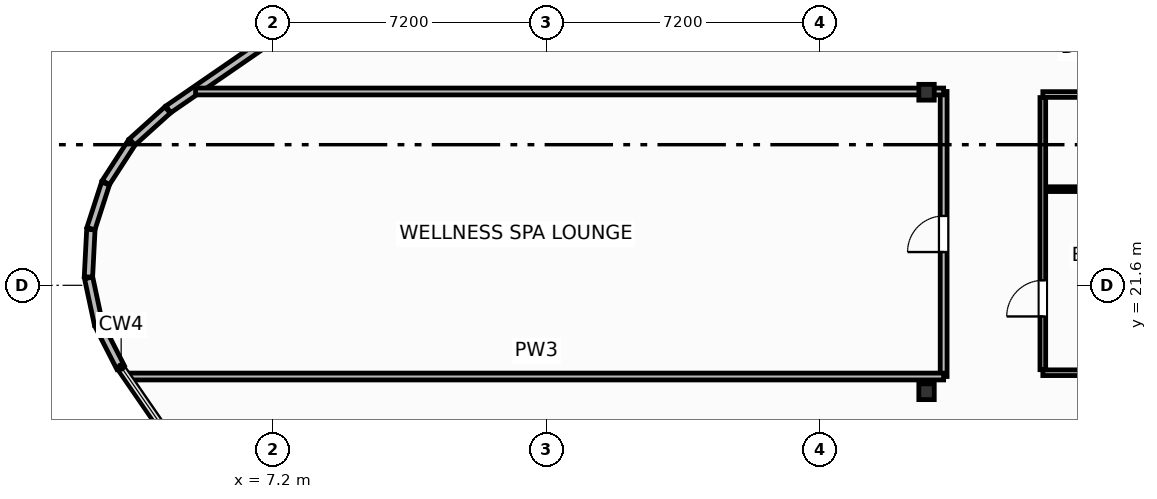
"""IFC4 building model, lengths in metres.
Left out: names, types, materials, properties, quantities, classifications, styles, units other than length and angle.
Written with IfcOpenShell. Run it as: python <this file> out.ifc"""

import sys

from ifc_helpers import new_model, si_unit, direction, frame, frame_2d, origin, origin_2d, place, context, subcontext, project, spatial, rectangle, i_section, extrude, element, fill, save


model = new_model("IFC4")
c1 = context("Model", 3, precision=1e-05, world=origin(), true_north=direction((0.0, 1.0)))
c2 = subcontext(c1, "Body", "Model", "MODEL_VIEW")
j1 = project(units=[si_unit("LENGTHUNIT", "METRE"), si_unit("PLANEANGLEUNIT", "RADIAN")], contexts=[c1])
p1 = place(None, origin())
s1 = spatial("IfcSite", under=j1, at=p1, CompositionType="ELEMENT")
p2 = place(p1, origin())
s2 = spatial("IfcBuilding", under=s1, at=p2, CompositionType="ELEMENT")
p3 = place(p2, frame((0.0, 0.0, 280.4)))
s3 = spatial("IfcBuildingStorey", under=s2, at=p3, CompositionType="ELEMENT", Elevation=280.4)
for number, where, z_axis, x_axis in (
    (1, (24.4, 18.8, 0.0), (0.0, 0.0, 1.0), (1.0, 0.0, 0.0)),
    (2, (24.4, 26.68, 0.0), (0.0, 0.0, 1.0), (1.0, 0.0, 0.0)),
):
    element("IfcColumn", number, at=place(p3, frame(where, z_axis=z_axis, x_axis=x_axis)), inside=s3, PredefinedType="COLUMN", context=c2, shape_type="SweptSolid", body=[
        extrude(i_section(OverallWidth=0.406, OverallDepth=0.416, WebThickness=0.03, FlangeThickness=0.048, FilletRadius=0.025, at=origin_2d()), origin(), (0.0, 0.0, 1.0), 3.7),
    ])
p4 = place(p3, frame((13.408, 32.402, 0.0), z_axis=(0.0, 0.0, 1.0), x_axis=(-0.823527634633, -0.567276154087, 0.0)))
e3 = element("IfcWall", 3, at=p4, inside=s3, PredefinedType="SOLIDWALL", context=c2, shape_type="SweptSolid", body=[
    extrude(rectangle(XDim=10.88, YDim=0.22, at=frame_2d((5.44, 0.0))), origin(), (0.0, 0.0, 1.0), 2.73),
])
p5 = place(p4, frame((4.39, 0.0, 0.8)))
e4 = element("IfcOpeningElement", 4, at=p5, cuts=e3, PredefinedType="OPENING", context=c2, shape_type="SweptSolid", body=[
    extrude(rectangle(XDim=2.1, YDim=1.75, at=frame_2d((1.05, 0.875))), frame((0.0, 0.12, 0.0), z_axis=(0.0, -1.0, 0.0), x_axis=(1.0, 0.0, 0.0)), (0.0, 0.0, 1.0), 0.24),
])
p6 = place(p3, frame((4.429, 26.213, 0.0), z_axis=(0.0, 0.0, 1.0), x_axis=(-0.742414330744, -0.669941013453, 0.0)))
e5 = element("IfcWall", 5, at=p6, inside=s3, PredefinedType="SOLIDWALL", context=c2, shape_type="SweptSolid", body=[
    extrude(rectangle(XDim=1.257, YDim=0.22, at=frame_2d((0.628, 0.0))), origin(), (0.0, 0.0, 1.0), 2.73),
])
for number, where, z_axis, x_axis in (
    (6, (3.482, 25.351, 0.0), (0.0, 0.0, 1.0), (-0.544, -0.839, 0.0)),
    (7, (2.796, 24.279, 0.0), (0.0, 0.0, 1.0), (-0.308, -0.951, 0.0)),
    (8, (2.41, 23.066, 0.0), (0.0, 0.0, 1.0), (-0.051, -0.999, 0.0)),
):
    element("IfcWall", number, at=place(p3, frame(where, z_axis=z_axis, x_axis=x_axis)), inside=s3, PredefinedType="SOLIDWALL", context=c2, shape_type="SweptSolid", body=[
        extrude(rectangle(XDim=1.249, YDim=0.22, at=frame_2d((0.624, 0.0))), origin(), (0.0, 0.0, 1.0), 2.73),
    ])
for number, where, z_axis, x_axis in (
    (9, (2.351, 21.795, 0.0), (0.0, 0.0, 1.0), (0.209, -0.978, 0.0)),
    (10, (2.623, 20.551, 0.0), (0.0, 0.0, 1.0), (0.455, -0.891, 0.0)),
):
    element("IfcWall", number, at=place(p3, frame(where, z_axis=z_axis, x_axis=x_axis)), inside=s3, PredefinedType="SOLIDWALL", context=c2, shape_type="SweptSolid", body=[
        extrude(rectangle(XDim=1.249, YDim=0.22, at=frame_2d((0.625, 0.0))), origin(), (0.0, 0.0, 1.0), 2.73),
    ])
p7 = place(p3, frame((24.85, 19.2, 0.0), z_axis=(0.0, 0.0, 1.0), x_axis=(0.0, 1.0, 0.0)))
e11 = element("IfcWall", 11, at=p7, inside=s3, PredefinedType="PARTITIONING", context=c2, shape_type="SweptSolid", body=[
    extrude(rectangle(XDim=7.5, YDim=0.18, at=frame_2d((3.75, 0.0))), origin(), (0.0, 0.0, 1.0), 3.45),
])
p8 = place(p7, frame((3.275, 0.0, 0.0)))
e12 = element("IfcOpeningElement", 12, at=p8, cuts=e11, PredefinedType="OPENING", context=c2, shape_type="SweptSolid", body=[
    extrude(rectangle(XDim=0.95, YDim=2.05, at=frame_2d((0.475, 1.025))), frame((0.0, 0.1, 0.0), z_axis=(0.0, -1.0, 0.0), x_axis=(1.0, 0.0, 0.0)), (0.0, 0.0, 1.0), 0.2),
])
p9 = place(p3, frame((3.419, 19.2, 0.0), z_axis=(0.0, 0.0, 1.0), x_axis=(1.0, 0.0, 0.0)))
e13 = element("IfcWall", 13, at=p9, inside=s3, PredefinedType="PARTITIONING", context=c2, shape_type="SweptSolid", body=[
    extrude(rectangle(XDim=21.431, YDim=0.18, at=frame_2d((10.715, 0.0))), origin(), (0.0, 0.0, 1.0), 3.45),
])
p10 = place(p3, frame((5.165, 26.7, 0.0), z_axis=(0.0, 0.0, 1.0), x_axis=(1.0, 0.0, 0.0)))
e14 = element("IfcWall", 14, at=p10, inside=s3, PredefinedType="PARTITIONING", context=c2, shape_type="SweptSolid", body=[
    extrude(rectangle(XDim=19.685, YDim=0.18, at=frame_2d((9.843, 0.0))), origin(), (0.0, 0.0, 1.0), 2.662),
])
p11 = place(p3, frame((27.46, 19.3, 0.0), z_axis=(0.0, 0.0, 1.0), x_axis=(1.0, 0.0, 0.0)))
e15 = element("IfcWall", 15, at=p11, inside=s3, PredefinedType="PARTITIONING", context=c2, shape_type="SweptSolid", body=[
    extrude(rectangle(XDim=6.1, YDim=0.15, at=frame_2d((3.05, 0.0))), origin(), (0.0, 0.0, 1.0), 2.662),
])
p12 = place(p3, frame((27.46, 26.62, 0.0), z_axis=(0.0, 0.0, 1.0), x_axis=(1.0, 0.0, 0.0)))
e16 = element("IfcWall", 16, at=p12, inside=s3, PredefinedType="PARTITIONING", context=c2, shape_type="SweptSolid", body=[
    extrude(rectangle(XDim=6.1, YDim=0.15, at=frame_2d((3.05, 0.0))), origin(), (0.0, 0.0, 1.0), 2.662),
])
p13 = place(p12, frame((1.15, 0.0, 0.0)))
e17 = element("IfcOpeningElement", 17, at=p13, cuts=e16, PredefinedType="OPENING", context=c2, shape_type="SweptSolid", body=[
    extrude(rectangle(XDim=0.9, YDim=2.05, at=frame_2d((0.45, 1.025))), frame((0.0, 0.085, 0.0), z_axis=(0.0, -1.0, 0.0), x_axis=(1.0, 0.0, 0.0)), (0.0, 0.0, 1.0), 0.17),
])
p14 = place(p12, frame((4.45, 0.0, 0.0)))
e18 = element("IfcOpeningElement", 18, at=p14, cuts=e16, PredefinedType="OPENING", context=c2, shape_type="SweptSolid", body=[
    extrude(rectangle(XDim=0.92, YDim=2.05, at=frame_2d((0.46, 1.025))), frame((0.0, 0.085, 0.0), z_axis=(0.0, -1.0, 0.0), x_axis=(1.0, 0.0, 0.0)), (0.0, 0.0, 1.0), 0.17),
])
p15 = place(p3, frame((27.52, 24.13, 0.0), z_axis=(0.0, 0.0, 1.0), x_axis=(1.0, 0.0, 0.0)))
e19 = element("IfcWall", 19, at=p15, inside=s3, PredefinedType="PARTITIONING", context=c2, shape_type="SweptSolid", body=[
    extrude(rectangle(XDim=3.7, YDim=0.125, at=frame_2d((1.85, 0.0))), origin(), (0.0, 0.0, 1.0), 3.45),
])
p16 = place(p3, frame((27.46, 19.38, 0.0), z_axis=(0.0, 0.0, 1.0), x_axis=(0.0, 1.0, 0.0)))
e20 = element("IfcWall", 20, at=p16, inside=s3, PredefinedType="PARTITIONING", context=c2, shape_type="SweptSolid", body=[
    extrude(rectangle(XDim=7.16, YDim=0.15, at=frame_2d((3.58, 0.0))), origin(), (0.0, 0.0, 1.0), 3.45),
])
p17 = place(p16, frame((1.4, 0.0, 0.0)))
e21 = element("IfcOpeningElement", 21, at=p17, cuts=e20, PredefinedType="OPENING", context=c2, shape_type="SweptSolid", body=[
    extrude(rectangle(XDim=0.95, YDim=2.05, at=frame_2d((0.475, 1.025))), frame((0.0, 0.085, 0.0), z_axis=(0.0, -1.0, 0.0), x_axis=(1.0, 0.0, 0.0)), (0.0, 0.0, 1.0), 0.17),
])
p18 = place(p8, origin())
e22 = element("IfcDoor", 22, at=p18, inside=s3, OperationType="SINGLE_SWING_LEFT", PredefinedType="DOOR", context=c2, shape_type="SweptSolid", body=[
    extrude(rectangle(XDim=0.95, YDim=2.05, at=frame_2d((0.475, 1.025))), frame((0.0, 0.025, 0.0), z_axis=(0.0, -1.0, 0.0), x_axis=(1.0, 0.0, 0.0)), (0.0, 0.0, 1.0), 0.05),
])
fill(e12, e22)
p19 = place(p17, origin())
e23 = element("IfcDoor", 23, at=p19, inside=s3, OperationType="SINGLE_SWING_LEFT", PredefinedType="DOOR", context=c2, shape_type="SweptSolid", body=[
    extrude(rectangle(XDim=0.95, YDim=2.05, at=frame_2d((0.475, 1.025))), frame((0.0, 0.025, 0.0), z_axis=(0.0, -1.0, 0.0), x_axis=(1.0, 0.0, 0.0)), (0.0, 0.0, 1.0), 0.05),
])
fill(e21, e23)
save(model, sys.argv[1])
